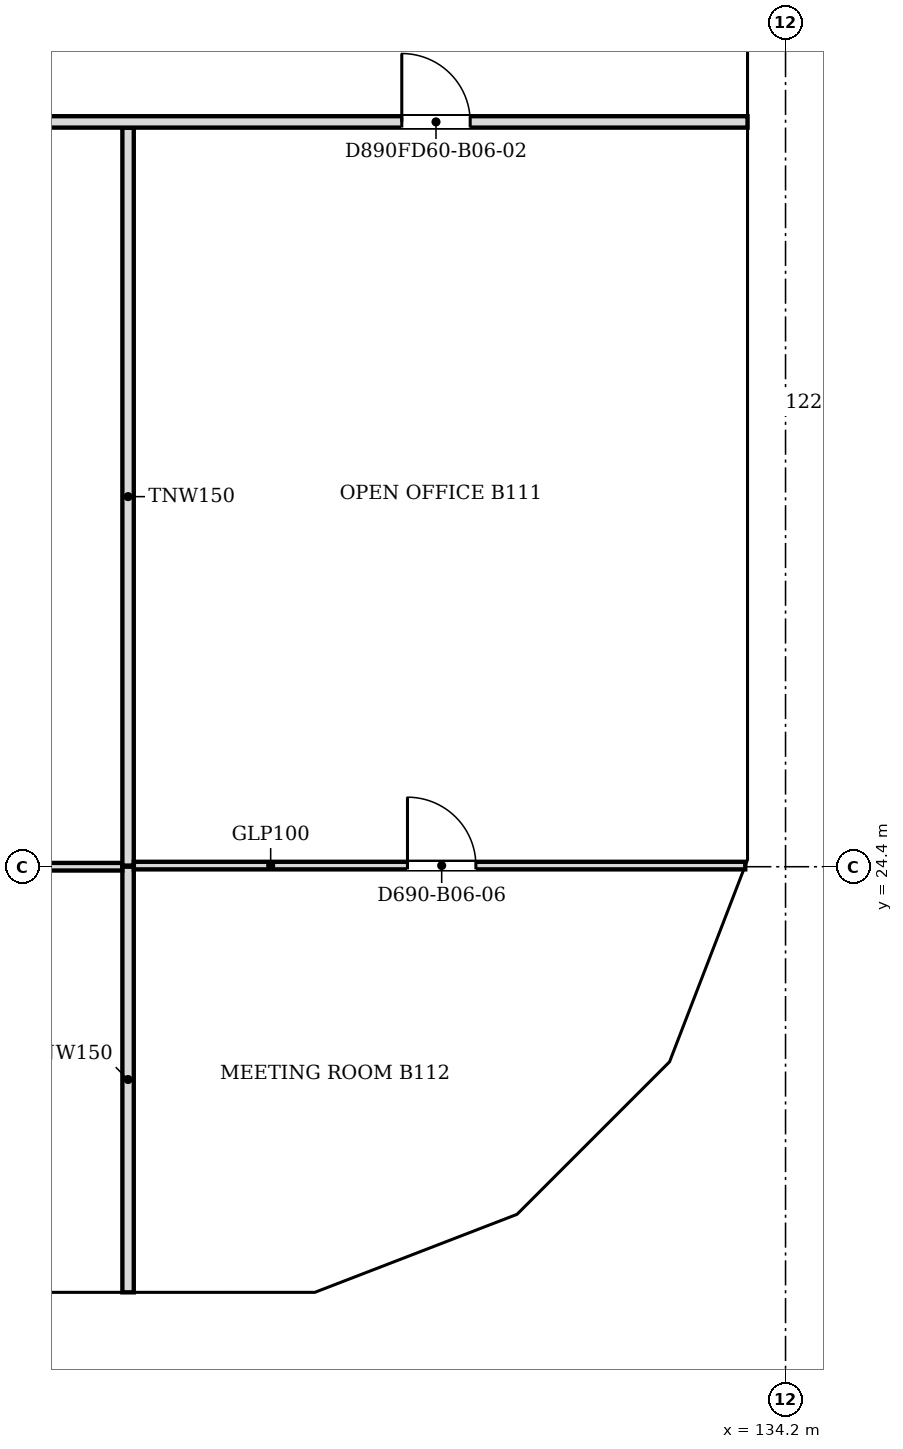
"""IFC4 building model, lengths in metres.
Left out: names, types, materials, properties, quantities, classifications, styles, units other than length and angle.
Written with IfcOpenShell. Run it as: python <this file> out.ifc"""

import sys

from ifc_helpers import new_model, si_unit, direction, frame, frame_2d, origin, place, context, subcontext, project, spatial, polyline, rectangle, outline, extrude, faceted_brep, source, transform, mapped, element, fill, save


model = new_model("IFC4")
c1 = context("Model", 3, precision=1e-05, world=origin(), true_north=direction((0.0, 1.0)))
c2 = subcontext(c1, "Body", "Model", "MODEL_VIEW")
j1 = project(units=[si_unit("LENGTHUNIT", "METRE"), si_unit("PLANEANGLEUNIT", "RADIAN")], contexts=[c1])
p1 = place(None, origin())
s1 = spatial("IfcSite", under=j1, at=p1, CompositionType="ELEMENT")
p2 = place(p1, origin())
s2 = spatial("IfcBuilding", under=s1, at=p2, CompositionType="ELEMENT")
p3 = place(p2, frame((0.0, 0.0, 60.0)))
s3 = spatial("IfcBuildingStorey", under=s2, at=p3, CompositionType="ELEMENT", Elevation=60.0)
m1 = source(origin(), c2, "Body", "Brep", [
    faceted_brep([(3.05, -0.25, 0.0), (6.053, -0.25, 3.8), (3.05, -0.25, 7.6), (0.0, -0.25, 3.8), (0.0, 0.25, 3.8), (3.05, 0.25, 7.6), (6.007, 0.25, 3.859), (6.007, 0.25, 3.741), (3.05, 0.25, 0.0), (6.053, 0.0, 3.8)], [[[0, 1, 2, 3]], [[4, 5, 6, 7, 8]], [[8, 7, 9, 1, 0]], [[6, 5, 2, 1, 9]], [[5, 4, 3, 2]], [[4, 8, 0, 3]], [[9, 7, 6]]]),
])
p4 = place(p3, frame((122.0, 18.55, -3.8), z_axis=(0.0, 0.0, 1.0), x_axis=(1.0, 0.0, 0.0)))
e1 = element("IfcWall", 1, at=p4, inside=s3, PredefinedType="SOLIDWALL", context=c2, shape_type="MappedRepresentation", body=[
    mapped(m1, transform((0.0, 0.0, 0.0), scale=1.0)),
])
m2 = source(origin(), c2, "Body", "SweptSolid", [
    extrude(outline(polyline([(3.049, 0.401), (5.735, 3.8), (3.049, 7.199), (0.321, 3.8), (3.049, 0.401)])), frame((0.0, 0.26, 0.0), z_axis=(0.0, -1.0, 0.0), x_axis=(1.0, 0.0, 0.0)), (0.0, 0.0, 1.0), 0.52),
])
p5 = place(p4, origin())
e2 = element("IfcOpeningElement", 2, at=p5, cuts=e1, PredefinedType="OPENING", context=c2, shape_type="MappedRepresentation", body=[
    mapped(m2, transform((0.0, 0.0, 0.0), scale=1.0)),
])
m3 = source(origin(), c2, "Body", "Brep", [
    faceted_brep([(2.95, -0.25, 0.0), (3.003, -0.25, 0.068), (3.003, -0.25, 7.532), (2.95, -0.25, 7.6), (0.0, -0.25, 3.8), (0.047, 0.25, 3.86), (2.898, 0.25, 7.532), (2.898, 0.25, 0.068), (0.047, 0.25, 3.74), (2.95, 0.0, 0.0), (2.95, 0.0, 7.6), (0.0, 0.0, 3.8)], [[[0, 1, 2, 3, 4]], [[5, 6, 7, 8]], [[1, 0, 9]], [[10, 3, 2]], [[6, 5, 11, 4, 3, 10]], [[8, 7, 9, 0, 4, 11]], [[8, 11, 5]], [[1, 9, 7, 6, 10, 2]]]),
])
p6 = place(p3, frame((128.053, 18.55, -3.8), z_axis=(0.0, 0.0, 1.0), x_axis=(0.933007896601, 0.359855894603, 0.0)))
e3 = element("IfcWall", 3, at=p6, inside=s3, PredefinedType="SOLIDWALL", context=c2, shape_type="MappedRepresentation", body=[
    mapped(m3, transform((0.0, 0.0, 0.0), scale=1.0)),
])
m4 = source(origin(), c2, "Body", "SweptSolid", [
    extrude(outline(polyline([(2.75, 6.935), (0.316, 3.8), (2.75, 0.665), (2.75, 6.935)])), frame((0.0, 0.26, 0.0), z_axis=(0.0, -1.0, 0.0), x_axis=(1.0, 0.0, 0.0)), (0.0, 0.0, 1.0), 0.52),
])
p7 = place(p6, origin())
e4 = element("IfcOpeningElement", 4, at=p7, cuts=e3, PredefinedType="OPENING", context=c2, shape_type="MappedRepresentation", body=[
    mapped(m4, transform((0.0, 0.0, 0.0), scale=1.0)),
])
m5 = source(origin(), c2, "Body", "Brep", [
    faceted_brep([(0.053, -0.25, 0.0), (2.997, -0.25, 3.8), (0.053, -0.25, 7.6), (0.0, -0.25, 7.532), (0.0, -0.25, 0.068), (0.106, 0.25, 7.532), (2.944, 0.25, 3.868), (2.944, 0.25, 3.732), (0.106, 0.25, 0.068), (2.997, 0.0, 3.8), (0.053, 0.0, 0.0), (0.053, 0.0, 7.6)], [[[0, 1, 2, 3, 4]], [[5, 6, 7, 8]], [[8, 7, 9, 1, 0, 10]], [[6, 5, 11, 2, 1, 9]], [[3, 2, 11]], [[10, 0, 4]], [[8, 10, 4, 3, 11, 5]], [[9, 7, 6]]]),
])
p8 = place(p3, frame((130.769, 19.574, -3.8), z_axis=(0.0, 0.0, 1.0), x_axis=(0.707106781187, 0.707106781187, 0.0)))
e5 = element("IfcWall", 5, at=p8, inside=s3, PredefinedType="SOLIDWALL", context=c2, shape_type="MappedRepresentation", body=[
    mapped(m5, transform((0.0, 0.0, 0.0), scale=1.0)),
])
m6 = source(origin(), c2, "Body", "SweptSolid", [
    extrude(outline(polyline([(0.253, 0.666), (2.681, 3.8), (0.253, 6.934), (0.253, 0.666)])), frame((0.0, 0.26, 0.0), z_axis=(0.0, -1.0, 0.0), x_axis=(1.0, 0.0, 0.0)), (0.0, 0.0, 1.0), 0.52),
])
p9 = place(p8, origin())
e6 = element("IfcOpeningElement", 6, at=p9, cuts=e5, PredefinedType="OPENING", context=c2, shape_type="MappedRepresentation", body=[
    mapped(m6, transform((0.0, 0.0, 0.0), scale=1.0)),
])
m7 = source(origin(), c2, "Body", "Brep", [
    faceted_brep([(2.95, -0.25, 0.0), (2.997, -0.25, 0.059), (2.997, -0.25, 7.541), (2.95, -0.25, 7.6), (0.0, -0.25, 3.8), (0.053, 0.25, 3.868), (2.904, 0.25, 7.54), (2.904, 0.25, 0.06), (0.053, 0.25, 3.732), (2.95, 0.0, 0.0), (2.95, 0.0, 7.6), (0.0, 0.0, 3.8)], [[[0, 1, 2, 3, 4]], [[5, 6, 7, 8]], [[1, 0, 9]], [[10, 3, 2]], [[6, 5, 11, 4, 3, 10]], [[8, 7, 9, 0, 4, 11]], [[8, 11, 5]], [[1, 9, 7, 6, 10, 2]]]),
])
p10 = place(p3, frame((132.888, 21.694, -3.8), z_axis=(0.0, 0.0, 1.0), x_axis=(0.359901446078, 0.932990326376, 0.0)))
e7 = element("IfcWall", 7, at=p10, inside=s3, PredefinedType="SOLIDWALL", context=c2, shape_type="MappedRepresentation", body=[
    mapped(m7, transform((0.0, 0.0, 0.0), scale=1.0)),
])
p11 = place(p10, origin())
e8 = element("IfcOpeningElement", 8, at=p11, cuts=e7, PredefinedType="OPENING", context=c2, shape_type="MappedRepresentation", body=[
    mapped(m4, transform((0.0, 0.0, 0.0), scale=1.0)),
])
m8 = source(origin(), c2, "Body", "Brep", [
    faceted_brep([(0.047, -0.25, 0.0), (3.05, -0.25, 3.8), (0.047, -0.25, 7.6), (0.0, -0.25, 7.54), (0.0, -0.25, 0.06), (0.093, 0.25, 7.541), (3.05, 0.25, 3.8), (0.093, 0.25, 0.059), (0.047, 0.0, 0.0), (0.047, 0.0, 7.6)], [[[0, 1, 2, 3, 4]], [[5, 6, 7]], [[7, 6, 1, 0, 8]], [[6, 5, 9, 2, 1]], [[3, 2, 9]], [[8, 0, 4]], [[7, 8, 4, 3, 9, 5]]]),
])
p12 = place(p3, frame((133.95, 24.4, -3.8), z_axis=(0.0, 0.0, 1.0), x_axis=(0.0, 1.0, 0.0)))
e9 = element("IfcWall", 9, at=p12, inside=s3, PredefinedType="SOLIDWALL", context=c2, shape_type="MappedRepresentation", body=[
    mapped(m8, transform((0.0, 0.0, 0.0), scale=1.0)),
])
m9 = source(origin(), c2, "Body", "SweptSolid", [
    extrude(outline(polyline([(0.247, 0.656), (2.731, 3.8), (0.247, 6.944), (0.247, 0.656)])), frame((0.0, 0.26, 0.0), z_axis=(0.0, -1.0, 0.0), x_axis=(1.0, 0.0, 0.0)), (0.0, 0.0, 1.0), 0.52),
])
p13 = place(p12, origin())
e10 = element("IfcOpeningElement", 10, at=p13, cuts=e9, PredefinedType="OPENING", context=c2, shape_type="MappedRepresentation", body=[
    mapped(m9, transform((0.0, 0.0, 0.0), scale=1.0)),
])
m10 = source(origin(), c2, "Body", "SweptSolid", [
    extrude(outline(polyline([(3.05, 0.0), (6.1, 3.8), (3.05, 7.6), (0.0, 3.8), (3.05, 0.0)])), frame((0.0, 0.25, 0.0), z_axis=(0.0, -1.0, 0.0), x_axis=(1.0, 0.0, 0.0)), (0.0, 0.0, 1.0), 0.5),
])
p14 = place(p3, frame((133.95, 27.45, -3.8), z_axis=(0.0, 0.0, 1.0), x_axis=(0.0, 1.0, 0.0)))
e11 = element("IfcWall", 11, at=p14, inside=s3, PredefinedType="SOLIDWALL", context=c2, shape_type="MappedRepresentation", body=[
    mapped(m10, transform((0.0, 0.0, 0.0), scale=1.0)),
])
m11 = source(origin(), c2, "Body", "SweptSolid", [
    extrude(outline(polyline([(3.05, 0.399), (5.78, 3.8), (3.05, 7.201), (0.321, 3.8), (3.05, 0.399)])), frame((0.0, 0.26, 0.0), z_axis=(0.0, -1.0, 0.0), x_axis=(1.0, 0.0, 0.0)), (0.0, 0.0, 1.0), 0.52),
])
p15 = place(p14, origin())
e12 = element("IfcOpeningElement", 12, at=p15, cuts=e11, PredefinedType="OPENING", context=c2, shape_type="MappedRepresentation", body=[
    mapped(m11, transform((0.0, 0.0, 0.0), scale=1.0)),
])
m12 = source(origin(), c2, "Body", "Brep", [
    faceted_brep([(3.05, -0.25, 0.0), (6.1, -0.25, 3.8), (6.1, -0.25, 3.8), (3.05, -0.25, 7.6), (0.0, -0.25, 3.8), (0.0, 0.25, 3.8), (3.05, 0.25, 7.6), (6.1, 0.25, 3.8), (6.1, 0.25, 3.8), (3.05, 0.25, 0.0)], [[[0, 1, 2, 3, 4]], [[5, 6, 7, 8, 9]], [[9, 8, 1, 0]], [[7, 6, 3, 2]], [[6, 5, 4, 3]], [[5, 9, 0, 4]], [[1, 8, 7, 2]]]),
])
p16 = place(p3, frame((133.95, 33.55, -3.8), z_axis=(0.0, 0.0, 1.0), x_axis=(0.0, 1.0, 0.0)))
e13 = element("IfcWall", 13, at=p16, inside=s3, PredefinedType="SOLIDWALL", context=c2, shape_type="MappedRepresentation", body=[
    mapped(m12, transform((0.0, 0.0, 0.0), scale=1.0)),
])
p17 = place(p16, origin())
e14 = element("IfcOpeningElement", 14, at=p17, cuts=e13, PredefinedType="OPENING", context=c2, shape_type="MappedRepresentation", body=[
    mapped(m11, transform((0.0, 0.0, 0.0), scale=1.0)),
])
m13 = source(origin(), c2, "Body", "SweptSolid", [
    extrude(outline(polyline([(3.05, 0.0), (6.1, 3.8), (0.0, 3.8), (3.05, 0.0)])), frame((0.0, 0.25, 0.0), z_axis=(0.0, -1.0, 0.0), x_axis=(1.0, 0.0, 0.0)), (0.0, 0.0, 1.0), 0.5),
])
p18 = place(p3, frame((118.95, 18.55, 0.0), z_axis=(0.0, 0.0, 1.0), x_axis=(1.0, 0.0, 0.0)))
e15 = element("IfcWall", 15, at=p18, inside=s3, PredefinedType="SOLIDWALL", context=c2, shape_type="MappedRepresentation", body=[
    mapped(m13, transform((0.0, 0.0, 0.0), scale=1.0)),
])
m14 = source(origin(), c2, "Body", "SweptSolid", [
    extrude(outline(polyline([(3.05, 0.399), (5.579, 3.55), (0.521, 3.55), (3.05, 0.399)])), frame((0.0, 0.26, 0.0), z_axis=(0.0, -1.0, 0.0), x_axis=(1.0, 0.0, 0.0)), (0.0, 0.0, 1.0), 0.52),
])
p19 = place(p18, origin())
e16 = element("IfcOpeningElement", 16, at=p19, cuts=e15, PredefinedType="OPENING", context=c2, shape_type="MappedRepresentation", body=[
    mapped(m14, transform((0.0, 0.0, 0.0), scale=1.0)),
])
m15 = source(origin(), c2, "Body", "Brep", [
    faceted_brep([(3.003, -0.25, 0.0), (3.05, -0.25, 0.06), (3.05, -0.25, 3.8), (0.0, -0.25, 3.8), (0.0, 0.25, 3.8), (2.957, 0.25, 3.8), (2.957, 0.25, 0.059), (3.003, 0.0, 0.0)], [[[0, 1, 2, 3]], [[4, 5, 6]], [[1, 0, 7]], [[5, 4, 3, 2]], [[4, 6, 7, 0, 3]], [[1, 7, 6, 5, 2]]]),
])
p20 = place(p3, frame((125.05, 18.55, 0.0), z_axis=(0.0, 0.0, 1.0), x_axis=(1.0, 0.0, 0.0)))
e17 = element("IfcWall", 17, at=p20, inside=s3, PredefinedType="SOLIDWALL", context=c2, shape_type="MappedRepresentation", body=[
    mapped(m15, transform((0.0, 0.0, 0.0), scale=1.0)),
])
m16 = source(origin(), c2, "Body", "SweptSolid", [
    extrude(outline(polyline([(2.803, 3.55), (0.516, 3.55), (2.803, 0.656), (2.803, 3.55)])), frame((0.0, 0.26, 0.0), z_axis=(0.0, -1.0, 0.0), x_axis=(1.0, 0.0, 0.0)), (0.0, 0.0, 1.0), 0.52),
])
p21 = place(p20, origin())
e18 = element("IfcOpeningElement", 18, at=p21, cuts=e17, PredefinedType="OPENING", context=c2, shape_type="MappedRepresentation", body=[
    mapped(m16, transform((0.0, 0.0, 0.0), scale=1.0)),
])
m17 = source(origin(), c2, "Body", "Brep", [
    faceted_brep([(0.047, -0.25, 0.0), (2.997, -0.25, 3.8), (0.0, -0.25, 3.8), (0.0, -0.25, 0.059), (0.093, 0.25, 3.8), (2.944, 0.25, 3.8), (2.944, 0.25, 3.732), (0.093, 0.25, 0.06), (2.997, 0.0, 3.8), (0.047, 0.0, 0.0)], [[[0, 1, 2, 3]], [[4, 5, 6, 7]], [[7, 6, 8, 1, 0, 9]], [[5, 4, 2, 1, 8]], [[9, 0, 3]], [[7, 9, 3, 2, 4]], [[6, 5, 8]]]),
])
p22 = place(p3, frame((128.01, 18.533, 0.0), z_axis=(0.0, 0.0, 1.0), x_axis=(0.932990326376, 0.359901446078, 0.0)))
e19 = element("IfcWall", 19, at=p22, inside=s3, PredefinedType="SOLIDWALL", context=c2, shape_type="MappedRepresentation", body=[
    mapped(m17, transform((0.0, 0.0, 0.0), scale=1.0)),
])
m18 = source(origin(), c2, "Body", "SweptSolid", [
    extrude(outline(polyline([(0.247, 0.665), (2.487, 3.55), (0.247, 3.55), (0.247, 0.665)])), frame((0.0, 0.26, 0.0), z_axis=(0.0, -1.0, 0.0), x_axis=(1.0, 0.0, 0.0)), (0.0, 0.0, 1.0), 0.52),
])
p23 = place(p22, origin())
e20 = element("IfcOpeningElement", 20, at=p23, cuts=e19, PredefinedType="OPENING", context=c2, shape_type="MappedRepresentation", body=[
    mapped(m18, transform((0.0, 0.0, 0.0), scale=1.0)),
])
m19 = source(origin(), c2, "Body", "Brep", [
    faceted_brep([(2.944, -0.25, 0.0), (2.997, -0.25, 0.068), (2.997, -0.25, 3.8), (0.0, -0.25, 3.8), (0.053, 0.25, 3.8), (2.891, 0.25, 3.8), (2.891, 0.25, 0.068), (0.053, 0.25, 3.732), (2.944, 0.0, 0.0), (0.0, 0.0, 3.8)], [[[0, 1, 2, 3]], [[4, 5, 6, 7]], [[1, 0, 8]], [[5, 4, 9, 3, 2]], [[7, 6, 8, 0, 3, 9]], [[7, 9, 4]], [[1, 8, 6, 5, 2]]]),
])
p24 = place(p3, frame((130.806, 19.612, 0.0), z_axis=(0.0, 0.0, 1.0), x_axis=(0.707106781187, 0.707106781187, 0.0)))
e21 = element("IfcWall", 21, at=p24, inside=s3, PredefinedType="SOLIDWALL", context=c2, shape_type="MappedRepresentation", body=[
    mapped(m19, transform((0.0, 0.0, 0.0), scale=1.0)),
])
m20 = source(origin(), c2, "Body", "SweptSolid", [
    extrude(outline(polyline([(2.744, 3.55), (0.51, 3.55), (2.744, 0.666), (2.744, 3.55)])), frame((0.0, 0.26, 0.0), z_axis=(0.0, -1.0, 0.0), x_axis=(1.0, 0.0, 0.0)), (0.0, 0.0, 1.0), 0.52),
])
p25 = place(p24, origin())
e22 = element("IfcOpeningElement", 22, at=p25, cuts=e21, PredefinedType="OPENING", context=c2, shape_type="MappedRepresentation", body=[
    mapped(m20, transform((0.0, 0.0, 0.0), scale=1.0)),
])
m21 = source(origin(), c2, "Body", "Brep", [
    faceted_brep([(0.053, -0.25, 0.0), (3.003, -0.25, 3.8), (0.0, -0.25, 3.8), (0.0, -0.25, 0.068), (0.106, 0.25, 3.8), (2.957, 0.25, 3.8), (2.957, 0.25, 3.74), (0.106, 0.25, 0.068), (3.003, 0.0, 3.8), (0.053, 0.0, 0.0)], [[[0, 1, 2, 3]], [[4, 5, 6, 7]], [[7, 6, 8, 1, 0, 9]], [[5, 4, 2, 1, 8]], [[9, 0, 3]], [[7, 9, 3, 2, 4]], [[6, 5, 8]]]),
])
p26 = place(p3, frame((132.869, 21.644, 0.0), z_axis=(0.0, 0.0, 1.0), x_axis=(0.359855894603, 0.933007896601, 0.0)))
e23 = element("IfcWall", 23, at=p26, inside=s3, PredefinedType="SOLIDWALL", context=c2, shape_type="MappedRepresentation", body=[
    mapped(m21, transform((0.0, 0.0, 0.0), scale=1.0)),
])
m22 = source(origin(), c2, "Body", "SweptSolid", [
    extrude(outline(polyline([(0.253, 0.665), (2.493, 3.55), (0.253, 3.55), (0.253, 0.665)])), frame((0.0, 0.26, 0.0), z_axis=(0.0, -1.0, 0.0), x_axis=(1.0, 0.0, 0.0)), (0.0, 0.0, 1.0), 0.52),
])
p27 = place(p26, origin())
e24 = element("IfcOpeningElement", 24, at=p27, cuts=e23, PredefinedType="OPENING", context=c2, shape_type="MappedRepresentation", body=[
    mapped(m22, transform((0.0, 0.0, 0.0), scale=1.0)),
])
m23 = source(origin(), c2, "Body", "Brep", [
    faceted_brep([(3.003, -0.25, 0.0), (6.053, -0.25, 3.8), (0.0, -0.25, 3.8), (0.047, 0.25, 3.8), (6.053, 0.25, 3.8), (3.003, 0.25, 0.0), (0.047, 0.25, 3.741), (0.0, 0.0, 3.8)], [[[0, 1, 2]], [[3, 4, 5, 6]], [[5, 4, 1, 0]], [[4, 3, 7, 2, 1]], [[6, 5, 0, 2, 7]], [[6, 7, 3]]]),
])
p28 = place(p3, frame((133.95, 24.447, 0.0), z_axis=(0.0, 0.0, 1.0), x_axis=(0.0, 1.0, 0.0)))
e25 = element("IfcWall", 25, at=p28, inside=s3, PredefinedType="SOLIDWALL", context=c2, shape_type="MappedRepresentation", body=[
    mapped(m23, transform((0.0, 0.0, 0.0), scale=1.0)),
])
m24 = source(origin(), c2, "Body", "SweptSolid", [
    extrude(outline(polyline([(3.005, 0.401), (5.532, 3.55), (0.516, 3.55), (3.005, 0.401)])), frame((0.0, 0.26, 0.0), z_axis=(0.0, -1.0, 0.0), x_axis=(1.0, 0.0, 0.0)), (0.0, 0.0, 1.0), 0.52),
])
p29 = place(p28, origin())
e26 = element("IfcOpeningElement", 26, at=p29, cuts=e25, PredefinedType="OPENING", context=c2, shape_type="MappedRepresentation", body=[
    mapped(m24, transform((0.0, 0.0, 0.0), scale=1.0)),
])
p30 = place(p3, frame((133.95, 30.5, 0.0), z_axis=(0.0, 0.0, 1.0), x_axis=(0.0, 1.0, 0.0)))
e27 = element("IfcWall", 27, at=p30, inside=s3, PredefinedType="SOLIDWALL", context=c2, shape_type="MappedRepresentation", body=[
    mapped(m13, transform((0.0, 0.0, 0.0), scale=1.0)),
])
p31 = place(p30, origin())
e28 = element("IfcOpeningElement", 28, at=p31, cuts=e27, PredefinedType="OPENING", context=c2, shape_type="MappedRepresentation", body=[
    mapped(m14, transform((0.0, 0.0, 0.0), scale=1.0)),
])
p32 = place(p3, frame((125.55, 18.8, 0.0), z_axis=(0.0, 0.0, 1.0), x_axis=(0.0, 1.0, 0.0)))
e29 = element("IfcWall", 29, at=p32, inside=s3, PredefinedType="PARTITIONING", context=c2, shape_type="SweptSolid", body=[
    extrude(rectangle(XDim=5.6, YDim=0.15, at=frame_2d((2.8, 0.0))), origin(), (0.0, 0.0, 1.0), 2.888),
])
p33 = place(p3, frame((122.451, 24.4, 0.0), z_axis=(0.0, 0.0, 1.0), x_axis=(1.0, 0.0, 0.0)))
e30 = element("IfcWall", 30, at=p33, inside=s3, PredefinedType="PARTITIONING", context=c2, shape_type="SweptSolid", body=[
    extrude(rectangle(XDim=3.023, YDim=0.1, at=frame_2d((1.512, 0.0))), origin(), (0.0, 0.0, 1.0), 2.888),
])
p34 = place(p3, frame((125.55, 24.415, 0.0), z_axis=(0.0, 0.0, 1.0), x_axis=(0.0, 1.0, 0.0)))
e31 = element("IfcWall", 31, at=p34, inside=s3, PredefinedType="PARTITIONING", context=c2, shape_type="SweptSolid", body=[
    extrude(rectangle(XDim=9.709, YDim=0.15, at=frame_2d((4.854, 0.0))), origin(), (0.0, 0.0, 1.0), 2.888),
])
p35 = place(p3, frame((133.67, 24.415, 0.0), z_axis=(0.0, 0.0, 1.0), x_axis=(-1.0, 0.0, 0.0)))
e32 = element("IfcWall", 32, at=p35, inside=s3, PredefinedType="PARTITIONING", context=c2, shape_type="SweptSolid", body=[
    extrude(rectangle(XDim=8.044, YDim=0.1, at=frame_2d((4.022, 0.0))), origin(), (0.0, 0.0, 1.0), 2.888),
])
m25 = source(origin(), c2, "Body", "SweptSolid", [
    extrude(rectangle(XDim=0.9, YDim=2.1, at=frame_2d((0.45, 1.05))), frame((0.0, 0.06, 0.0), z_axis=(0.0, -1.0, 0.0), x_axis=(1.0, 0.0, 0.0)), (0.0, 0.0, 1.0), 0.12),
])
p36 = place(p35, frame((3.544, 0.0, 0.0)))
e33 = element("IfcOpeningElement", 33, at=p36, cuts=e32, PredefinedType="OPENING", context=c2, shape_type="MappedRepresentation", body=[
    mapped(m25, transform((0.0, 0.0, 0.0), scale=1.0)),
])
p37 = place(p3, frame((133.7, 34.2, 0.0), z_axis=(0.0, 0.0, 1.0), x_axis=(-1.0, 0.0, 0.0)))
e34 = element("IfcWall", 34, at=p37, inside=s3, PredefinedType="PARTITIONING", context=c2, shape_type="SweptSolid", body=[
    extrude(rectangle(XDim=47.8, YDim=0.15, at=frame_2d((23.9, 0.0))), origin(), (0.0, 0.0, 1.0), 2.888),
])
m26 = source(origin(), c2, "Body", "SweptSolid", [
    extrude(rectangle(XDim=0.9, YDim=2.1, at=frame_2d((0.45, 1.05))), frame((0.0, 0.085, 0.0), z_axis=(0.0, -1.0, 0.0), x_axis=(1.0, 0.0, 0.0)), (0.0, 0.0, 1.0), 0.17),
])
p38 = place(p37, frame((22.949, 0.0, 0.0)))
e35 = element("IfcOpeningElement", 35, at=p38, cuts=e34, PredefinedType="OPENING", context=c2, shape_type="MappedRepresentation", body=[
    mapped(m26, transform((0.0, 0.0, 0.0), scale=1.0)),
])
p39 = place(p37, frame((3.649, 0.0, 0.0)))
e36 = element("IfcOpeningElement", 36, at=p39, cuts=e34, PredefinedType="OPENING", context=c2, shape_type="MappedRepresentation", body=[
    mapped(m26, transform((0.0, 0.0, 0.0), scale=1.0)),
])
p40 = place(p37, frame((30.799, 0.0, 0.0)))
e37 = element("IfcOpeningElement", 37, at=p40, cuts=e34, PredefinedType="OPENING", context=c2, shape_type="MappedRepresentation", body=[
    mapped(m26, transform((0.0, 0.0, 0.0), scale=1.0)),
])
p41 = place(p37, frame((41.5, 0.0, 0.0)))
e38 = element("IfcOpeningElement", 38, at=p41, cuts=e34, PredefinedType="OPENING", context=c2, shape_type="MappedRepresentation", body=[
    mapped(m26, transform((0.0, 0.0, 0.0), scale=1.0)),
])
p42 = place(p37, frame((13.85, 0.0, 0.0)))
e39 = element("IfcOpeningElement", 39, at=p42, cuts=e34, PredefinedType="OPENING", context=c2, shape_type="MappedRepresentation", body=[
    mapped(m26, transform((0.0, 0.0, 0.0), scale=1.0)),
])
m27 = source(origin(), c2, "Body", "SweptSolid", [
    extrude(rectangle(XDim=0.9, YDim=2.1, at=frame_2d((0.45, 1.05))), frame((0.0, 0.025, 0.0), z_axis=(0.0, -1.0, 0.0), x_axis=(1.0, 0.0, 0.0)), (0.0, 0.0, 1.0), 0.05),
])
p43 = place(p36, origin())
e40 = element("IfcDoor", 40, at=p43, inside=s3, OperationType="SINGLE_SWING_RIGHT", PredefinedType="DOOR", context=c2, shape_type="MappedRepresentation", body=[
    mapped(m27, transform((0.0, 0.0, 0.0), scale=1.0)),
])
fill(e33, e40)
p44 = place(p39, origin())
e41 = element("IfcDoor", 41, at=p44, inside=s3, OperationType="SINGLE_SWING_RIGHT", PredefinedType="DOOR", context=c2, shape_type="MappedRepresentation", body=[
    mapped(m27, transform((0.0, 0.0, 0.0), scale=1.0)),
])
fill(e36, e41)
save(model, sys.argv[1])
